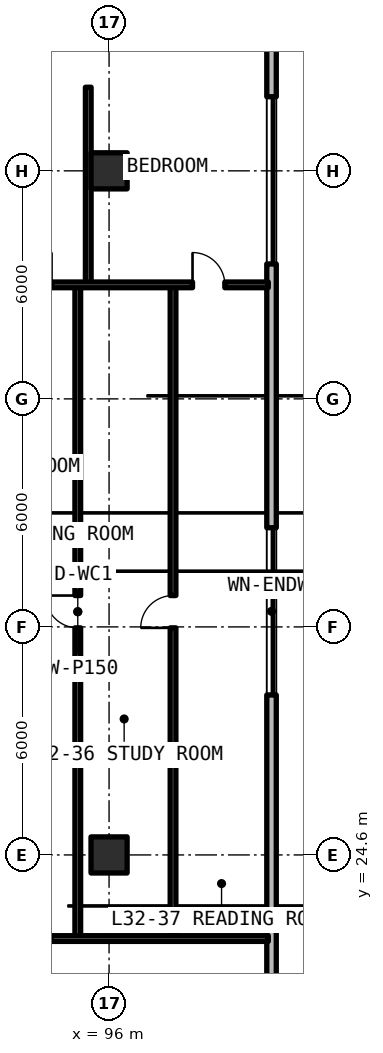
"""IFC4 building model, lengths in metres.
Left out: names, types, materials, properties, quantities, classifications, styles, units other than length and angle.
Written with IfcOpenShell. Run it as: python <this file> out.ifc"""

import sys

from ifc_helpers import new_model, si_unit, direction, frame, frame_2d, origin, origin_2d, place, context, subcontext, project, spatial, rectangle, extrude, element, fill, save


model = new_model("IFC4")
c1 = context("Model", 3, precision=1e-05, world=origin(), true_north=direction((0.0, 1.0)))
c2 = subcontext(c1, "Body", "Model", "MODEL_VIEW")
j1 = project(units=[si_unit("LENGTHUNIT", "METRE"), si_unit("PLANEANGLEUNIT", "RADIAN")], contexts=[c1])
p1 = place(None, origin())
s1 = spatial("IfcSite", under=j1, at=p1, CompositionType="ELEMENT")
p2 = place(p1, origin())
s2 = spatial("IfcBuilding", under=s1, at=p2, CompositionType="ELEMENT")
p3 = place(p2, frame((0.0, 0.0, 115.83)))
s3 = spatial("IfcBuildingStorey", under=s2, at=p3, CompositionType="ELEMENT", Elevation=115.83)
for number, where, z_axis, x_axis in (
    (1, (96.0, 24.6, 0.0), (0.0, 0.0, 1.0), (1.0, 0.0, 0.0)),
    (2, (96.0, 42.6, 0.0), (0.0, 0.0, 1.0), (1.0, 0.0, 0.0)),
):
    element("IfcColumn", number, at=place(p3, frame(where, z_axis=z_axis, x_axis=x_axis)), inside=s3, PredefinedType="COLUMN", context=c2, shape_type="SweptSolid", body=[
        extrude(rectangle(XDim=0.95, YDim=0.95, at=origin_2d()), origin(), (0.0, 0.0, 1.0), 3.63),
    ])
p4 = place(p3, frame((100.275, 13.852, 0.0), z_axis=(0.0, 0.0, 1.0), x_axis=(0.0, 1.0, 0.0)))
e3 = element("IfcWall", 3, at=p4, inside=s3, PredefinedType="SOLIDWALL", context=c2, shape_type="SweptSolid", body=[
    extrude(rectangle(XDim=39.496, YDim=0.25, at=frame_2d((19.748, 0.0))), origin(), (0.0, 0.0, 1.0), 3.41),
])
p5 = place(p4, frame((36.448, 0.0, 0.0)))
e4 = element("IfcOpeningElement", 4, at=p5, cuts=e3, PredefinedType="OPENING", context=c2, shape_type="SweptSolid", body=[
    extrude(rectangle(XDim=1.1, YDim=2.15, at=frame_2d((0.55, 1.075))), frame((0.0, 0.135, 0.0), z_axis=(0.0, -1.0, 0.0), x_axis=(1.0, 0.0, 0.0)), (0.0, 0.0, 1.0), 0.27),
])
p6 = place(p4, frame((14.958, 0.0, 0.78)))
e5 = element("IfcOpeningElement", 5, at=p6, cuts=e3, PredefinedType="OPENING", context=c2, shape_type="SweptSolid", body=[
    extrude(rectangle(XDim=4.4, YDim=1.66, at=frame_2d((2.2, 0.83))), frame((0.0, 0.135, 0.0), z_axis=(0.0, -1.0, 0.0), x_axis=(1.0, 0.0, 0.0)), (0.0, 0.0, 1.0), 0.27),
])
p7 = place(p4, frame((26.298, 0.0, 0.78)))
e6 = element("IfcOpeningElement", 6, at=p7, cuts=e3, PredefinedType="OPENING", context=c2, shape_type="SweptSolid", body=[
    extrude(rectangle(XDim=4.4, YDim=1.66, at=frame_2d((2.2, 0.83))), frame((0.0, 0.135, 0.0), z_axis=(0.0, -1.0, 0.0), x_axis=(1.0, 0.0, 0.0)), (0.0, 0.0, 1.0), 0.27),
])
p8 = place(p4, frame((2.454, 0.0, 0.78)))
e7 = element("IfcOpeningElement", 7, at=p8, cuts=e3, PredefinedType="OPENING", context=c2, shape_type="SweptSolid", body=[
    extrude(rectangle(XDim=1.4, YDim=1.65, at=frame_2d((0.7, 0.825))), frame((0.0, 0.135, 0.0), z_axis=(0.0, -1.0, 0.0), x_axis=(1.0, 0.0, 0.0)), (0.0, 0.0, 1.0), 0.27),
])
p9 = place(p3, frame((95.177, 22.4, 0.0), z_axis=(0.0, 0.0, 1.0), x_axis=(0.0, 1.0, 0.0)))
e8 = element("IfcWall", 8, at=p9, inside=s3, PredefinedType="PARTITIONING", context=c2, shape_type="SweptSolid", body=[
    extrude(rectangle(XDim=17.2, YDim=0.15, at=frame_2d((8.6, 0.0))), origin(), (0.0, 0.0, 1.0), 2.63),
])
p10 = place(p9, frame((8.175, 0.0, 0.0)))
e9 = element("IfcOpeningElement", 9, at=p10, cuts=e8, PredefinedType="OPENING", context=c2, shape_type="SweptSolid", body=[
    extrude(rectangle(XDim=0.85, YDim=2.1, at=frame_2d((0.425, 1.05))), frame((0.0, 0.085, 0.0), z_axis=(0.0, -1.0, 0.0), x_axis=(1.0, 0.0, 0.0)), (0.0, 0.0, 1.0), 0.17),
])
p11 = place(p3, frame((97.683, 22.4, 0.0), z_axis=(0.0, 0.0, 1.0), x_axis=(0.0, 1.0, 0.0)))
e10 = element("IfcWall", 10, at=p11, inside=s3, PredefinedType="PARTITIONING", context=c2, shape_type="SweptSolid", body=[
    extrude(rectangle(XDim=17.2, YDim=0.15, at=frame_2d((8.6, 0.0))), origin(), (0.0, 0.0, 1.0), 2.63),
])
p12 = place(p11, frame((8.175, 0.0, 0.0)))
e11 = element("IfcOpeningElement", 11, at=p12, cuts=e10, PredefinedType="OPENING", context=c2, shape_type="SweptSolid", body=[
    extrude(rectangle(XDim=0.85, YDim=2.1, at=frame_2d((0.425, 1.05))), frame((0.0, 0.085, 0.0), z_axis=(0.0, -1.0, 0.0), x_axis=(1.0, 0.0, 0.0)), (0.0, 0.0, 1.0), 0.17),
])
p13 = place(p3, frame((95.452, 39.6, 0.0), z_axis=(0.0, 0.0, 1.0), x_axis=(0.0, 1.0, 0.0)))
e12 = element("IfcWall", 12, at=p13, inside=s3, PredefinedType="PARTITIONING", context=c2, shape_type="SweptSolid", body=[
    extrude(rectangle(XDim=5.2, YDim=0.15, at=frame_2d((2.6, 0.0))), origin(), (0.0, 0.0, 1.0), 2.63),
])
p14 = place(p3, frame((90.32, 39.6, 0.0), z_axis=(0.0, 0.0, 1.0), x_axis=(1.0, 0.0, 0.0)))
e13 = element("IfcWall", 13, at=p14, inside=s3, PredefinedType="PARTITIONING", context=c2, shape_type="SweptSolid", body=[
    extrude(rectangle(XDim=9.87, YDim=0.15, at=frame_2d((4.935, 0.0))), origin(), (0.0, 0.0, 1.0), 2.63),
])
p15 = place(p14, frame((3.316, 0.0, 0.0)))
e14 = element("IfcOpeningElement", 14, at=p15, cuts=e13, PredefinedType="OPENING", context=c2, shape_type="SweptSolid", body=[
    extrude(rectangle(XDim=0.85, YDim=2.1, at=frame_2d((0.425, 1.05))), frame((0.0, 0.085, 0.0), z_axis=(0.0, -1.0, 0.0), x_axis=(1.0, 0.0, 0.0)), (0.0, 0.0, 1.0), 0.17),
])
p16 = place(p14, frame((7.876, 0.0, 0.0)))
e15 = element("IfcOpeningElement", 15, at=p16, cuts=e13, PredefinedType="OPENING", context=c2, shape_type="SweptSolid", body=[
    extrude(rectangle(XDim=0.85, YDim=2.1, at=frame_2d((0.425, 1.05))), frame((0.0, 0.085, 0.0), z_axis=(0.0, -1.0, 0.0), x_axis=(1.0, 0.0, 0.0)), (0.0, 0.0, 1.0), 0.17),
])
p17 = place(p3, frame((90.32, 22.4, 0.0), z_axis=(0.0, 0.0, 1.0), x_axis=(1.0, 0.0, 0.0)))
e16 = element("IfcWall", 16, at=p17, inside=s3, PredefinedType="SOLIDWALL", context=c2, shape_type="SweptSolid", body=[
    extrude(rectangle(XDim=9.87, YDim=0.15, at=frame_2d((4.935, 0.0))), origin(), (0.0, 0.0, 1.0), 2.63),
])
p18 = place(p17, frame((3.193, 0.0, 0.0)))
e17 = element("IfcOpeningElement", 17, at=p18, cuts=e16, PredefinedType="OPENING", context=c2, shape_type="SweptSolid", body=[
    extrude(rectangle(XDim=0.95, YDim=2.15, at=frame_2d((0.475, 1.075))), frame((0.0, 0.085, 0.0), z_axis=(0.0, -1.0, 0.0), x_axis=(1.0, 0.0, 0.0)), (0.0, 0.0, 1.0), 0.17),
])
p19 = place(p6, origin())
e18 = element("IfcWindow", 18, at=p19, inside=s3, PartitioningType="SINGLE_PANEL", PredefinedType="WINDOW", context=c2, shape_type="SweptSolid", body=[
    extrude(rectangle(XDim=4.4, YDim=1.66, at=frame_2d((2.2, 0.83))), frame((0.0, 0.03, 0.0), z_axis=(0.0, -1.0, 0.0), x_axis=(1.0, 0.0, 0.0)), (0.0, 0.0, 1.0), 0.06),
])
fill(e5, e18)
p20 = place(p7, origin())
e19 = element("IfcWindow", 19, at=p20, inside=s3, PartitioningType="SINGLE_PANEL", PredefinedType="WINDOW", context=c2, shape_type="SweptSolid", body=[
    extrude(rectangle(XDim=4.4, YDim=1.66, at=frame_2d((2.2, 0.83))), frame((0.0, 0.03, 0.0), z_axis=(0.0, -1.0, 0.0), x_axis=(1.0, 0.0, 0.0)), (0.0, 0.0, 1.0), 0.06),
])
fill(e6, e19)
p21 = place(p10, origin())
e20 = element("IfcDoor", 20, at=p21, inside=s3, OperationType="SINGLE_SWING_RIGHT", PredefinedType="DOOR", context=c2, shape_type="SweptSolid", body=[
    extrude(rectangle(XDim=0.85, YDim=2.1, at=frame_2d((0.425, 1.05))), frame((0.0, 0.025, 0.0), z_axis=(0.0, -1.0, 0.0), x_axis=(1.0, 0.0, 0.0)), (0.0, 0.0, 1.0), 0.05),
])
fill(e9, e20)
p22 = place(p12, origin())
e21 = element("IfcDoor", 21, at=p22, inside=s3, OperationType="SINGLE_SWING_LEFT", PredefinedType="DOOR", context=c2, shape_type="SweptSolid", body=[
    extrude(rectangle(XDim=0.85, YDim=2.1, at=frame_2d((0.425, 1.05))), frame((0.0, 0.025, 0.0), z_axis=(0.0, -1.0, 0.0), x_axis=(1.0, 0.0, 0.0)), (0.0, 0.0, 1.0), 0.05),
])
fill(e11, e21)
p23 = place(p16, origin())
e22 = element("IfcDoor", 22, at=p23, inside=s3, OperationType="SINGLE_SWING_LEFT", PredefinedType="DOOR", context=c2, shape_type="SweptSolid", body=[
    extrude(rectangle(XDim=0.85, YDim=2.1, at=frame_2d((0.425, 1.05))), frame((0.0, 0.025, 0.0), z_axis=(0.0, -1.0, 0.0), x_axis=(1.0, 0.0, 0.0)), (0.0, 0.0, 1.0), 0.05),
])
fill(e15, e22)
save(model, sys.argv[1])
